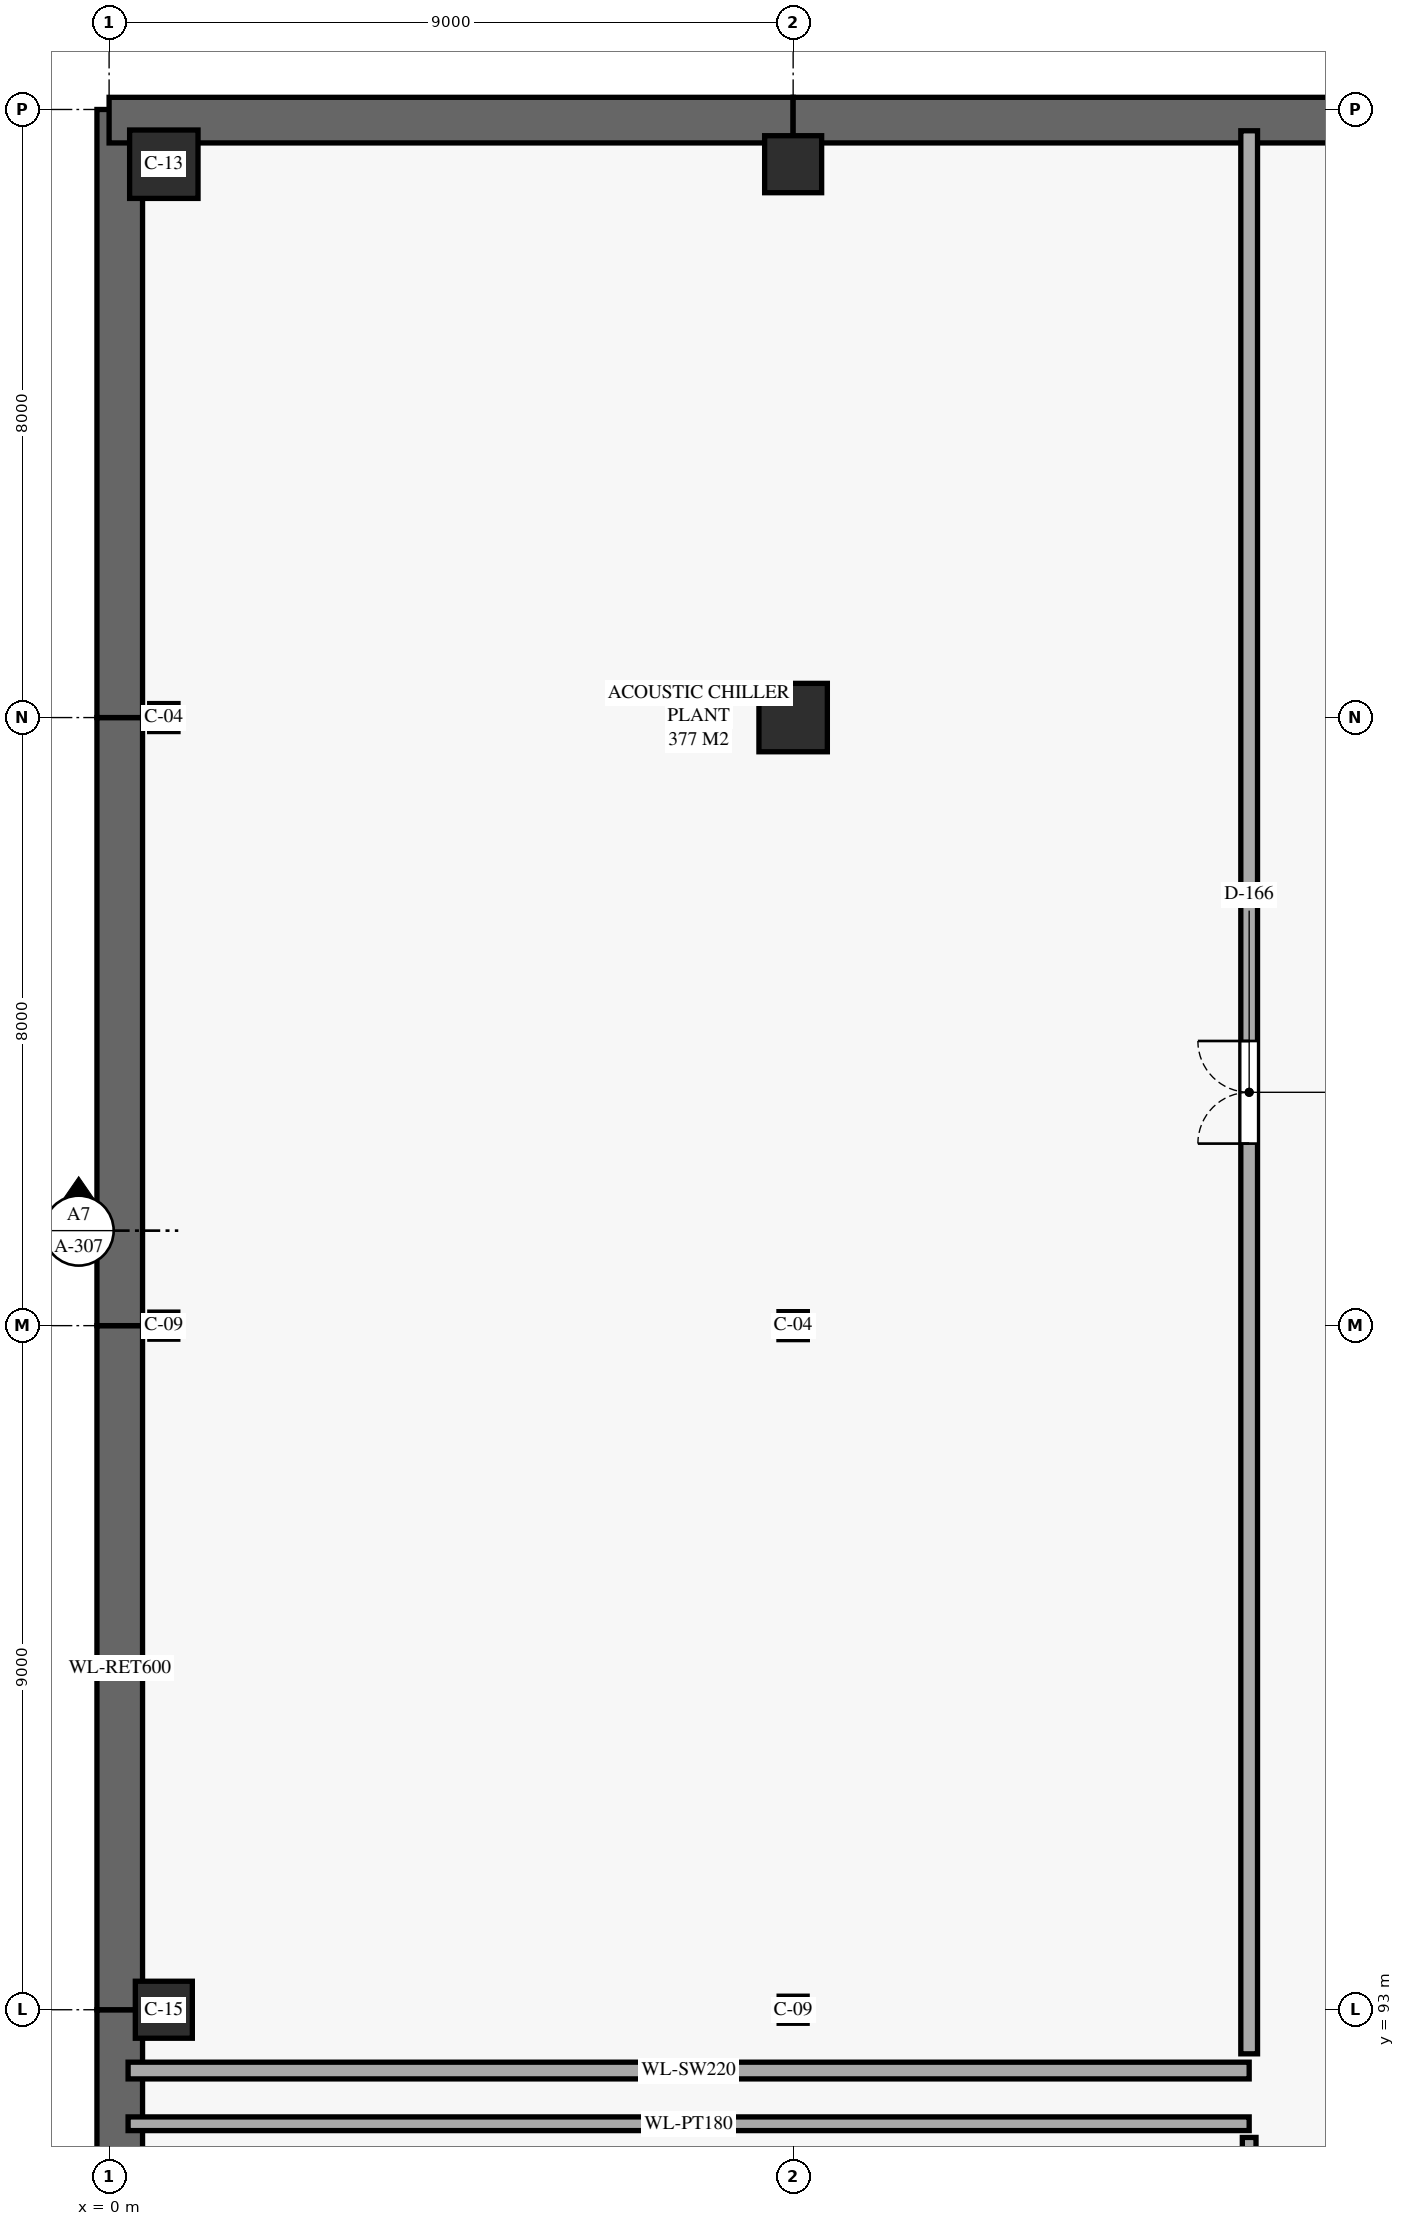
"""IFC4 building model, lengths in metres.
Left out: names, types, materials, properties, quantities, classifications, styles, units other than length and angle.
Written with IfcOpenShell. Run it as: python <this file> out.ifc"""

import sys

from ifc_helpers import new_model, si_unit, direction, frame, frame_2d, origin, origin_2d, place, context, subcontext, project, spatial, rectangle, i_section, extrude, element, fill, save


model = new_model("IFC4")
c1 = context("Model", 3, precision=1e-05, world=origin(), true_north=direction((0.0, 1.0)))
c2 = subcontext(c1, "Body", "Model", "MODEL_VIEW")
j1 = project(units=[si_unit("LENGTHUNIT", "METRE"), si_unit("PLANEANGLEUNIT", "RADIAN")], contexts=[c1])
p1 = place(None, origin())
s1 = spatial("IfcSite", under=j1, at=p1, CompositionType="ELEMENT")
p2 = place(p1, origin())
s2 = spatial("IfcBuilding", under=s1, at=p2, CompositionType="ELEMENT")
p3 = place(p2, frame((0.0, 0.0, -5.4)))
s3 = spatial("IfcBuildingStorey", under=s2, at=p3, CompositionType="ELEMENT", Elevation=-5.4)
p4 = place(p3, frame((0.72, 93.0, -0.6), z_axis=(0.0, 0.0, 1.0), x_axis=(1.0, 0.0, 0.0)))
e1 = element("IfcColumn", 1, at=p4, inside=s3, PredefinedType="COLUMN", context=c2, shape_type="SweptSolid", body=[
    extrude(rectangle(XDim=0.75, YDim=0.75, at=origin_2d()), origin(), (0.0, 0.0, 1.0), 6.0),
])
p5 = place(p3, frame((0.72, 102.0, -0.6), z_axis=(0.0, 0.0, 1.0), x_axis=(1.0, 0.0, 0.0)))
e2 = element("IfcColumn", 2, at=p5, inside=s3, PredefinedType="COLUMN", context=c2, shape_type="SweptSolid", body=[
    extrude(i_section(OverallWidth=0.368, OverallDepth=0.356, WebThickness=0.011, FlangeThickness=0.018, FilletRadius=0.015, at=origin_2d()), origin(), (0.0, 0.0, 1.0), 6.0),
])
p6 = place(p3, frame((0.72, 110.0, -0.6), z_axis=(0.0, 0.0, 1.0), x_axis=(1.0, 0.0, 0.0)))
e3 = element("IfcColumn", 3, at=p6, inside=s3, PredefinedType="COLUMN", context=c2, shape_type="SweptSolid", body=[
    extrude(i_section(OverallWidth=0.373, OverallDepth=0.368, WebThickness=0.015, FlangeThickness=0.024, FilletRadius=0.015, at=origin_2d()), origin(), (0.0, 0.0, 1.0), 6.0),
])
p7 = place(p3, frame((0.72, 117.28, -0.6), z_axis=(0.0, 0.0, 1.0), x_axis=(1.0, 0.0, 0.0)))
e4 = element("IfcColumn", 4, at=p7, inside=s3, PredefinedType="COLUMN", context=c2, shape_type="SweptSolid", body=[
    extrude(rectangle(XDim=0.9, YDim=0.9, at=origin_2d()), origin(), (0.0, 0.0, 1.0), 6.0),
])
p8 = place(p3, frame((9.0, 93.0, -0.6), z_axis=(0.0, 0.0, 1.0), x_axis=(1.0, 0.0, 0.0)))
e5 = element("IfcColumn", 5, at=p8, inside=s3, PredefinedType="COLUMN", context=c2, shape_type="SweptSolid", body=[
    extrude(i_section(OverallWidth=0.368, OverallDepth=0.356, WebThickness=0.011, FlangeThickness=0.018, FilletRadius=0.015, at=origin_2d()), origin(), (0.0, 0.0, 1.0), 6.0),
])
p9 = place(p3, frame((9.0, 102.0, -0.6), z_axis=(0.0, 0.0, 1.0), x_axis=(1.0, 0.0, 0.0)))
e6 = element("IfcColumn", 6, at=p9, inside=s3, PredefinedType="COLUMN", context=c2, shape_type="SweptSolid", body=[
    extrude(i_section(OverallWidth=0.373, OverallDepth=0.368, WebThickness=0.015, FlangeThickness=0.024, FilletRadius=0.015, at=origin_2d()), origin(), (0.0, 0.0, 1.0), 6.0),
])
p10 = place(p3, frame((9.0, 110.0, -0.6), z_axis=(0.0, 0.0, 1.0), x_axis=(1.0, 0.0, 0.0)))
e7 = element("IfcColumn", 7, at=p10, inside=s3, PredefinedType="COLUMN", context=c2, shape_type="SweptSolid", body=[
    extrude(rectangle(XDim=0.9, YDim=0.9, at=origin_2d()), origin(), (0.0, 0.0, 1.0), 6.0),
])
p11 = place(p3, frame((9.0, 117.28, -0.6), z_axis=(0.0, 0.0, 1.0), x_axis=(1.0, 0.0, 0.0)))
e8 = element("IfcColumn", 8, at=p11, inside=s3, PredefinedType="COLUMN", context=c2, shape_type="SweptSolid", body=[
    extrude(rectangle(XDim=0.75, YDim=0.75, at=origin_2d()), origin(), (0.0, 0.0, 1.0), 6.0),
])
for number, where, z_axis, x_axis in (
    (9, (0.14, 84.0, 0.0), (0.0, 0.0, 1.0), (0.0, 1.0, 0.0)),
    (10, (0.14, 93.0, 0.0), (0.0, 0.0, 1.0), (0.0, 1.0, 0.0)),
):
    element("IfcWall", number, at=place(p3, frame(where, z_axis=z_axis, x_axis=x_axis)), inside=s3, PredefinedType="USERDEFINED", context=c2, shape_type="SweptSolid", body=[
        extrude(rectangle(XDim=9.0, YDim=0.6, at=frame_2d((4.5, 0.0))), origin(), (0.0, 0.0, 1.0), 5.05),
    ])
for number, where, z_axis, x_axis in (
    (11, (0.14, 102.0, 0.0), (0.0, 0.0, 1.0), (0.0, 1.0, 0.0)),
    (12, (0.14, 110.0, 0.0), (0.0, 0.0, 1.0), (0.0, 1.0, 0.0)),
):
    element("IfcWall", number, at=place(p3, frame(where, z_axis=z_axis, x_axis=x_axis)), inside=s3, PredefinedType="USERDEFINED", context=c2, shape_type="SweptSolid", body=[
        extrude(rectangle(XDim=8.0, YDim=0.6, at=frame_2d((4.0, 0.0))), origin(), (0.0, 0.0, 1.0), 5.05),
    ])
for number, where, z_axis, x_axis in (
    (13, (0.0, 117.86, 0.0), (0.0, 0.0, 1.0), (1.0, 0.0, 0.0)),
    (14, (9.0, 117.86, 0.0), (0.0, 0.0, 1.0), (1.0, 0.0, 0.0)),
):
    element("IfcWall", number, at=place(p3, frame(where, z_axis=z_axis, x_axis=x_axis)), inside=s3, PredefinedType="USERDEFINED", context=c2, shape_type="SweptSolid", body=[
        extrude(rectangle(XDim=9.0, YDim=0.6, at=frame_2d((4.5, 0.0))), origin(), (0.0, 0.0, 1.0), 5.05),
    ])
p12 = place(p3, frame((15.0, 91.5, 0.0), z_axis=(0.0, 0.0, 1.0), x_axis=(-1.0, 0.0, 0.0)))
e15 = element("IfcWall", 15, at=p12, inside=s3, PredefinedType="PARTITIONING", context=c2, shape_type="SweptSolid", body=[
    extrude(rectangle(XDim=14.75, YDim=0.18, at=frame_2d((7.375, 0.0))), origin(), (0.0, 0.0, 1.0), 5.05),
])
p13 = place(p3, frame((15.0, 64.68, 0.0), z_axis=(0.0, 0.0, 1.0), x_axis=(0.0, 1.0, 0.0)))
e16 = element("IfcWall", 16, at=p13, inside=s3, PredefinedType="PARTITIONING", context=c2, shape_type="SweptSolid", body=[
    extrude(rectangle(XDim=26.64, YDim=0.18, at=frame_2d((13.32, 0.0))), origin(), (0.0, 0.0, 1.0), 5.05),
])
p14 = place(p13, frame((12.595, 0.0, 0.0)))
e17 = element("IfcOpeningElement", 17, at=p14, cuts=e16, PredefinedType="OPENING", context=c2, shape_type="SweptSolid", body=[
    extrude(rectangle(XDim=1.45, YDim=2.4, at=frame_2d((0.725, 1.2))), frame((0.0, 0.1, 0.0), z_axis=(0.0, -1.0, 0.0), x_axis=(1.0, 0.0, 0.0)), (0.0, 0.0, 1.0), 0.2),
])
p15 = place(p3, frame((0.25, 92.2, 0.0), z_axis=(0.0, 0.0, 1.0), x_axis=(1.0, 0.0, 0.0)))
e18 = element("IfcWall", 18, at=p15, inside=s3, PredefinedType="SOLIDWALL", context=c2, shape_type="SweptSolid", body=[
    extrude(rectangle(XDim=14.75, YDim=0.22, at=frame_2d((7.375, 0.0))), origin(), (0.0, 0.0, 1.0), 5.05),
])
p16 = place(p3, frame((15.0, 92.42, 0.0), z_axis=(0.0, 0.0, 1.0), x_axis=(0.0, 1.0, 0.0)))
e19 = element("IfcWall", 19, at=p16, inside=s3, PredefinedType="SOLIDWALL", context=c2, shape_type="SweptSolid", body=[
    extrude(rectangle(XDim=25.3, YDim=0.22, at=frame_2d((12.65, 0.0))), origin(), (0.0, 0.0, 1.0), 5.05),
])
p17 = place(p16, frame((11.975, 0.0, 0.0)))
e20 = element("IfcOpeningElement", 20, at=p17, cuts=e19, PredefinedType="OPENING", context=c2, shape_type="SweptSolid", body=[
    extrude(rectangle(XDim=1.35, YDim=2.25, at=frame_2d((0.675, 1.125))), frame((0.0, 0.12, 0.0), z_axis=(0.0, -1.0, 0.0), x_axis=(1.0, 0.0, 0.0)), (0.0, 0.0, 1.0), 0.24),
])
p18 = place(p17, origin())
e21 = element("IfcDoor", 21, at=p18, inside=s3, OperationType="DOUBLE_DOOR_SINGLE_SWING", PredefinedType="DOOR", context=c2, shape_type="SweptSolid", body=[
    extrude(rectangle(XDim=1.35, YDim=2.25, at=frame_2d((0.675, 1.125))), frame((0.0, 0.025, 0.0), z_axis=(0.0, -1.0, 0.0), x_axis=(1.0, 0.0, 0.0)), (0.0, 0.0, 1.0), 0.05),
])
fill(e20, e21)
save(model, sys.argv[1])
